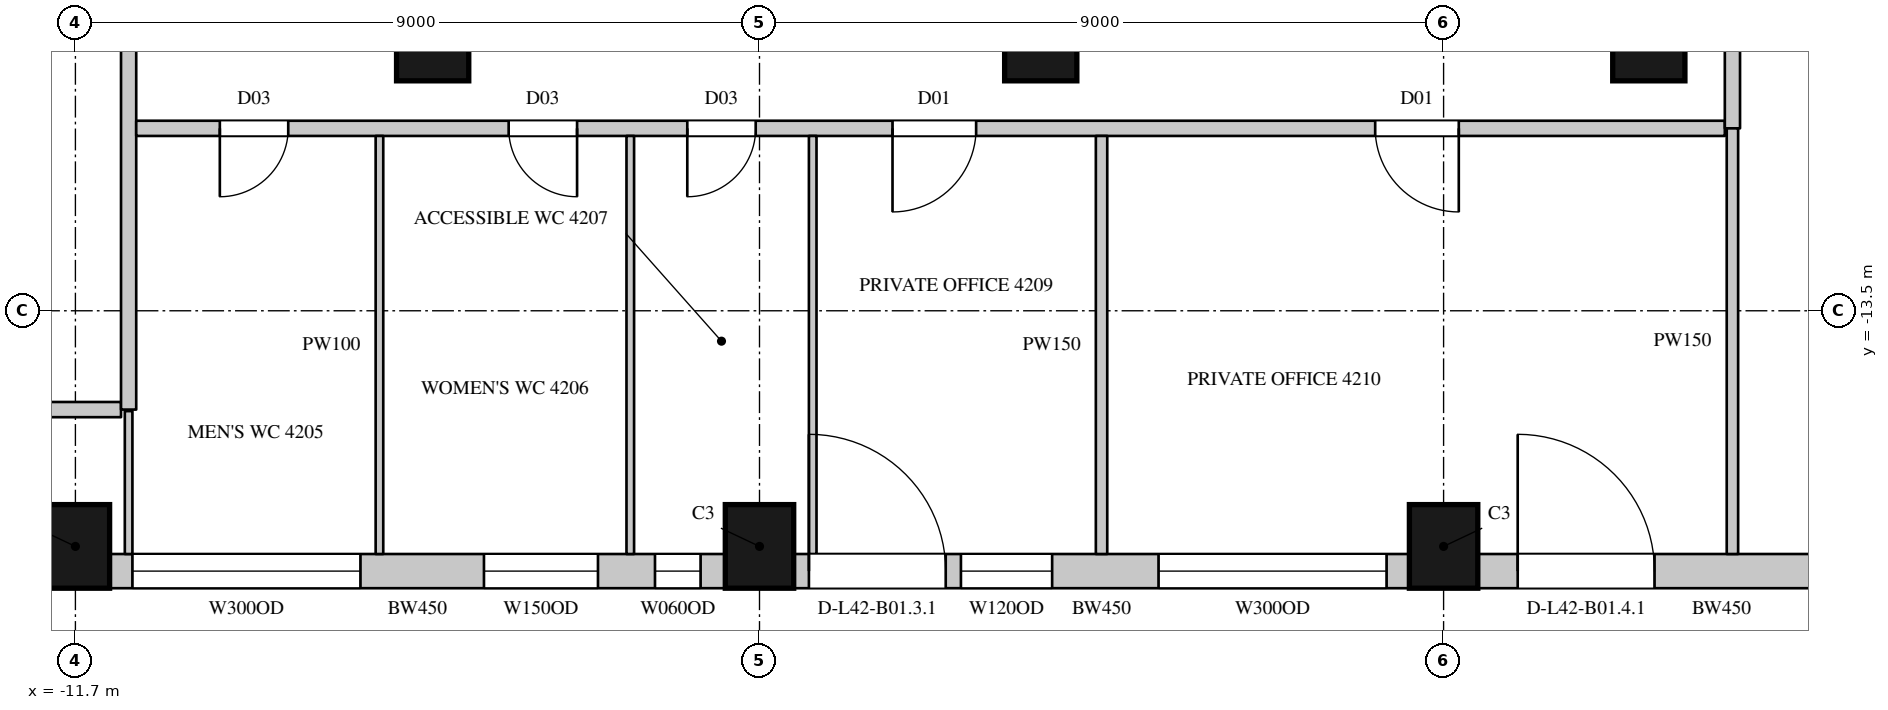
"""IFC4 building model, lengths in metres.
Left out: names, types, materials, properties, quantities, classifications, styles, units other than length and angle.
Written with IfcOpenShell. Run it as: python <this file> out.ifc"""

import sys

from ifc_helpers import new_model, si_unit, direction, frame, frame_2d, origin, origin_2d, place, context, subcontext, project, spatial, rectangle, circle, extrude, element, fill, save


model = new_model("IFC4")
c1 = context("Model", 3, precision=1e-05, world=origin(), true_north=direction((0.0, 1.0)))
c2 = subcontext(c1, "Body", "Model", "MODEL_VIEW")
j1 = project(units=[si_unit("LENGTHUNIT", "METRE"), si_unit("PLANEANGLEUNIT", "RADIAN")], contexts=[c1])
p1 = place(None, origin())
s1 = spatial("IfcSite", under=j1, at=p1, CompositionType="ELEMENT")
p2 = place(p1, origin())
s2 = spatial("IfcBuilding", under=s1, at=p2, CompositionType="ELEMENT")
p3 = place(p2, frame((0.0, 0.0, 193.3)))
s3 = spatial("IfcBuildingStorey", under=s2, at=p3, CompositionType="ELEMENT", Elevation=193.3)
for number, where, z_axis, x_axis in (
    (1, (-11.7, -16.6, 0.0), (0.0, 0.0, 1.0), (1.0, 0.0, 0.0)),
    (2, (-2.7, -16.6, 0.0), (0.0, 0.0, 1.0), (1.0, 0.0, 0.0)),
    (3, (6.3, -16.6, 0.0), (0.0, 0.0, 1.0), (1.0, 0.0, 0.0)),
):
    element("IfcColumn", number, at=place(p3, frame(where, z_axis=z_axis, x_axis=x_axis)), inside=s3, PredefinedType="COLUMN", context=c2, shape_type="SweptSolid", body=[
        extrude(rectangle(XDim=0.9, YDim=1.1, at=origin_2d()), origin(), (0.0, 0.0, 1.0), 4.1),
    ])
for number, where, z_axis, x_axis in (
    (4, (-7.0, -10.0, 0.0), (0.0, 0.0, 1.0), (1.0, 0.0, 0.0)),
    (5, (1.0, -10.0, 0.0), (0.0, 0.0, 1.0), (1.0, 0.0, 0.0)),
    (6, (9.0, -10.0, 0.0), (0.0, 0.0, 1.0), (1.0, 0.0, 0.0)),
):
    element("IfcColumn", number, at=place(p3, frame(where, z_axis=z_axis, x_axis=x_axis)), inside=s3, PredefinedType="COLUMN", context=c2, shape_type="SweptSolid", body=[
        extrude(circle(Radius=0.475, at=origin_2d()), origin(), (0.0, 0.0, 1.0), 4.1),
    ])
p4 = place(p3, frame((-11.25, -16.925, 0.0), z_axis=(0.0, 0.0, 1.0), x_axis=(1.0, 0.0, 0.0)))
e7 = element("IfcWall", 7, at=p4, inside=s3, PredefinedType="SOLIDWALL", context=c2, shape_type="SweptSolid", body=[
    extrude(rectangle(XDim=8.1, YDim=0.45, at=frame_2d((4.05, 0.0))), origin(), (0.0, 0.0, 1.0), 3.8),
])
p5 = place(p4, frame((0.3, 0.0, 1.05)))
e8 = element("IfcOpeningElement", 8, at=p5, cuts=e7, PredefinedType="OPENING", context=c2, shape_type="SweptSolid", body=[
    extrude(rectangle(XDim=3.0, YDim=2.4, at=frame_2d((1.5, 1.2))), frame((0.0, 0.235, 0.0), z_axis=(0.0, -1.0, 0.0), x_axis=(1.0, 0.0, 0.0)), (0.0, 0.0, 1.0), 0.47),
])
p6 = place(p4, frame((4.925, 0.0, 1.05)))
e9 = element("IfcOpeningElement", 9, at=p6, cuts=e7, PredefinedType="OPENING", context=c2, shape_type="SweptSolid", body=[
    extrude(rectangle(XDim=1.5, YDim=2.4, at=frame_2d((0.75, 1.2))), frame((0.0, 0.235, 0.0), z_axis=(0.0, -1.0, 0.0), x_axis=(1.0, 0.0, 0.0)), (0.0, 0.0, 1.0), 0.47),
])
p7 = place(p4, frame((7.175, 0.0, 1.05)))
e10 = element("IfcOpeningElement", 10, at=p7, cuts=e7, PredefinedType="OPENING", context=c2, shape_type="SweptSolid", body=[
    extrude(rectangle(XDim=0.6, YDim=2.4, at=frame_2d((0.3, 1.2))), frame((0.0, 0.235, 0.0), z_axis=(0.0, -1.0, 0.0), x_axis=(1.0, 0.0, 0.0)), (0.0, 0.0, 1.0), 0.47),
])
p8 = place(p3, frame((-2.25, -16.925, 0.0), z_axis=(0.0, 0.0, 1.0), x_axis=(1.0, 0.0, 0.0)))
e11 = element("IfcWall", 11, at=p8, inside=s3, PredefinedType="SOLIDWALL", context=c2, shape_type="SweptSolid", body=[
    extrude(rectangle(XDim=8.1, YDim=0.45, at=frame_2d((4.05, 0.0))), origin(), (0.0, 0.0, 1.0), 3.8),
])
p9 = place(p8, frame((0.2, 0.0, 0.0)))
e12 = element("IfcOpeningElement", 12, at=p9, cuts=e11, PredefinedType="OPENING", context=c2, shape_type="SweptSolid", body=[
    extrude(rectangle(XDim=1.8, YDim=2.4, at=frame_2d((0.9, 1.2))), frame((0.0, 0.235, 0.0), z_axis=(0.0, -1.0, 0.0), x_axis=(1.0, 0.0, 0.0)), (0.0, 0.0, 1.0), 0.47),
])
p10 = place(p8, frame((2.2, 0.0, 1.05)))
e13 = element("IfcOpeningElement", 13, at=p10, cuts=e11, PredefinedType="OPENING", context=c2, shape_type="SweptSolid", body=[
    extrude(rectangle(XDim=1.2, YDim=2.4, at=frame_2d((0.6, 1.2))), frame((0.0, 0.235, 0.0), z_axis=(0.0, -1.0, 0.0), x_axis=(1.0, 0.0, 0.0)), (0.0, 0.0, 1.0), 0.47),
])
p11 = place(p8, frame((4.8, 0.0, 1.05)))
e14 = element("IfcOpeningElement", 14, at=p11, cuts=e11, PredefinedType="OPENING", context=c2, shape_type="SweptSolid", body=[
    extrude(rectangle(XDim=3.0, YDim=2.4, at=frame_2d((1.5, 1.2))), frame((0.0, 0.235, 0.0), z_axis=(0.0, -1.0, 0.0), x_axis=(1.0, 0.0, 0.0)), (0.0, 0.0, 1.0), 0.47),
])
p12 = place(p3, frame((6.75, -16.925, 0.0), z_axis=(0.0, 0.0, 1.0), x_axis=(1.0, 0.0, 0.0)))
e15 = element("IfcWall", 15, at=p12, inside=s3, PredefinedType="SOLIDWALL", context=c2, shape_type="SweptSolid", body=[
    extrude(rectangle(XDim=6.414, YDim=0.45, at=frame_2d((3.207, 0.0))), origin(), (0.0, 0.0, 1.0), 3.8),
])
p13 = place(p12, frame((0.525, 0.0, 0.0)))
e16 = element("IfcOpeningElement", 16, at=p13, cuts=e15, PredefinedType="OPENING", context=c2, shape_type="SweptSolid", body=[
    extrude(rectangle(XDim=1.8, YDim=2.4, at=frame_2d((0.9, 1.2))), frame((0.0, 0.235, 0.0), z_axis=(0.0, -1.0, 0.0), x_axis=(1.0, 0.0, 0.0)), (0.0, 0.0, 1.0), 0.47),
])
p14 = place(p3, frame((-13.97, -14.8, 0.0), z_axis=(0.0, 0.0, 1.0), x_axis=(1.0, 0.0, 0.0)))
e17 = element("IfcWall", 17, at=p14, inside=s3, PredefinedType="PARTITIONING", context=c2, shape_type="SweptSolid", body=[
    extrude(rectangle(XDim=2.87, YDim=0.2, at=frame_2d((1.435, 0.0))), origin(), (0.0, 0.0, 1.0), 3.8),
])
p15 = place(p3, frame((-11.0, -14.8, 0.0), z_axis=(0.0, 0.0, 1.0), x_axis=(0.0, 1.0, 0.0)))
e18 = element("IfcWall", 18, at=p15, inside=s3, PredefinedType="PARTITIONING", context=c2, shape_type="SweptSolid", body=[
    extrude(rectangle(XDim=29.6, YDim=0.2, at=frame_2d((14.8, 0.0))), origin(), (0.0, 0.0, 1.0), 3.8),
])
p16 = place(p15, frame((20.15, 0.0, 0.0)))
e19 = element("IfcOpeningElement", 19, at=p16, cuts=e18, PredefinedType="OPENING", context=c2, shape_type="SweptSolid", body=[
    extrude(rectangle(XDim=1.5, YDim=2.4, at=frame_2d((0.75, 1.2))), frame((0.0, 0.11, 0.0), z_axis=(0.0, -1.0, 0.0), x_axis=(1.0, 0.0, 0.0)), (0.0, 0.0, 1.0), 0.22),
])
p17 = place(p3, frame((-10.9, -11.1, 0.0), z_axis=(0.0, 0.0, 1.0), x_axis=(1.0, 0.0, 0.0)))
e20 = element("IfcWall", 20, at=p17, inside=s3, PredefinedType="PARTITIONING", context=c2, shape_type="SweptSolid", body=[
    extrude(rectangle(XDim=20.9, YDim=0.2, at=frame_2d((10.45, 0.0))), origin(), (0.0, 0.0, 1.0), 3.8),
])
p18 = place(p17, frame((1.1, 0.0, 0.0)))
e21 = element("IfcOpeningElement", 21, at=p18, cuts=e20, PredefinedType="OPENING", context=c2, shape_type="SweptSolid", body=[
    extrude(rectangle(XDim=0.9, YDim=2.2, at=frame_2d((0.45, 1.1))), frame((0.0, 0.11, 0.0), z_axis=(0.0, -1.0, 0.0), x_axis=(1.0, 0.0, 0.0)), (0.0, 0.0, 1.0), 0.22),
])
p19 = place(p17, frame((4.9, 0.0, 0.0)))
e22 = element("IfcOpeningElement", 22, at=p19, cuts=e20, PredefinedType="OPENING", context=c2, shape_type="SweptSolid", body=[
    extrude(rectangle(XDim=0.9, YDim=2.2, at=frame_2d((0.45, 1.1))), frame((0.0, 0.11, 0.0), z_axis=(0.0, -1.0, 0.0), x_axis=(1.0, 0.0, 0.0)), (0.0, 0.0, 1.0), 0.22),
])
p20 = place(p17, frame((7.25, 0.0, 0.0)))
e23 = element("IfcOpeningElement", 23, at=p20, cuts=e20, PredefinedType="OPENING", context=c2, shape_type="SweptSolid", body=[
    extrude(rectangle(XDim=0.9, YDim=2.2, at=frame_2d((0.45, 1.1))), frame((0.0, 0.11, 0.0), z_axis=(0.0, -1.0, 0.0), x_axis=(1.0, 0.0, 0.0)), (0.0, 0.0, 1.0), 0.22),
])
p21 = place(p17, frame((9.95, 0.0, 0.0)))
e24 = element("IfcOpeningElement", 24, at=p21, cuts=e20, PredefinedType="OPENING", context=c2, shape_type="SweptSolid", body=[
    extrude(rectangle(XDim=1.1, YDim=2.4, at=frame_2d((0.55, 1.2))), frame((0.0, 0.11, 0.0), z_axis=(0.0, -1.0, 0.0), x_axis=(1.0, 0.0, 0.0)), (0.0, 0.0, 1.0), 0.22),
])
p22 = place(p17, frame((16.3, 0.0, 0.0)))
e25 = element("IfcOpeningElement", 25, at=p22, cuts=e20, PredefinedType="OPENING", context=c2, shape_type="SweptSolid", body=[
    extrude(rectangle(XDim=1.1, YDim=2.4, at=frame_2d((0.55, 1.2))), frame((0.0, 0.11, 0.0), z_axis=(0.0, -1.0, 0.0), x_axis=(1.0, 0.0, 0.0)), (0.0, 0.0, 1.0), 0.22),
])
p23 = place(p3, frame((10.1, -11.1, 0.0), z_axis=(0.0, 0.0, 1.0), x_axis=(0.0, 1.0, 0.0)))
e26 = element("IfcWall", 26, at=p23, inside=s3, PredefinedType="PARTITIONING", context=c2, shape_type="SweptSolid", body=[
    extrude(rectangle(XDim=23.2, YDim=0.2, at=frame_2d((11.6, 0.0))), origin(), (0.0, 0.0, 1.0), 3.8),
])
p24 = place(p23, frame((8.0, 0.0, 0.0)))
e27 = element("IfcOpeningElement", 27, at=p24, cuts=e26, PredefinedType="OPENING", context=c2, shape_type="SweptSolid", body=[
    extrude(rectangle(XDim=1.5, YDim=2.4, at=frame_2d((0.75, 1.2))), frame((0.0, 0.11, 0.0), z_axis=(0.0, -1.0, 0.0), x_axis=(1.0, 0.0, 0.0)), (0.0, 0.0, 1.0), 0.22),
])
p25 = place(p23, frame((18.95, 0.0, 0.0)))
e28 = element("IfcOpeningElement", 28, at=p25, cuts=e26, PredefinedType="OPENING", context=c2, shape_type="SweptSolid", body=[
    extrude(rectangle(XDim=1.1, YDim=2.4, at=frame_2d((0.55, 1.2))), frame((0.0, 0.11, 0.0), z_axis=(0.0, -1.0, 0.0), x_axis=(1.0, 0.0, 0.0)), (0.0, 0.0, 1.0), 0.22),
])
p26 = place(p23, frame((2.7, 0.0, 0.0)))
e29 = element("IfcOpeningElement", 29, at=p26, cuts=e26, PredefinedType="OPENING", context=c2, shape_type="SweptSolid", body=[
    extrude(rectangle(XDim=1.1, YDim=2.4, at=frame_2d((0.55, 1.2))), frame((0.0, 0.11, 0.0), z_axis=(0.0, -1.0, 0.0), x_axis=(1.0, 0.0, 0.0)), (0.0, 0.0, 1.0), 0.22),
])
p27 = place(p3, frame((1.8, -16.7, 0.0), z_axis=(0.0, 0.0, 1.0), x_axis=(0.0, 1.0, 0.0)))
e30 = element("IfcWall", 30, at=p27, inside=s3, PredefinedType="PARTITIONING", context=c2, shape_type="SweptSolid", body=[
    extrude(rectangle(XDim=5.5, YDim=0.15, at=frame_2d((2.75, 0.0))), origin(), (0.0, 0.0, 1.0), 3.15),
])
p28 = place(p3, frame((10.1, -16.7, 0.0), z_axis=(0.0, 0.0, 1.0), x_axis=(0.0, 1.0, 0.0)))
e31 = element("IfcWall", 31, at=p28, inside=s3, PredefinedType="PARTITIONING", context=c2, shape_type="SweptSolid", body=[
    extrude(rectangle(XDim=5.6, YDim=0.15, at=frame_2d((2.8, 0.0))), origin(), (0.0, 0.0, 1.0), 3.8),
])
p29 = place(p3, frame((-11.0, -16.7, 0.0), z_axis=(0.0, 0.0, 1.0), x_axis=(0.0, 1.0, 0.0)))
e32 = element("IfcWall", 32, at=p29, inside=s3, PredefinedType="PARTITIONING", context=c2, shape_type="SweptSolid", body=[
    extrude(rectangle(XDim=1.88, YDim=0.1, at=frame_2d((0.94, 0.0))), origin(), (0.0, 0.0, 1.0), 3.8),
])
for number, where, z_axis, x_axis in (
    (33, (-7.7, -16.7, 0.0), (0.0, 0.0, 1.0), (0.0, 1.0, 0.0)),
    (34, (-4.4, -16.7, 0.0), (0.0, 0.0, 1.0), (0.0, 1.0, 0.0)),
    (35, (-2.0, -16.7, 0.0), (0.0, 0.0, 1.0), (0.0, 1.0, 0.0)),
):
    element("IfcWall", number, at=place(p3, frame(where, z_axis=z_axis, x_axis=x_axis)), inside=s3, PredefinedType="PARTITIONING", context=c2, shape_type="SweptSolid", body=[
        extrude(rectangle(XDim=5.5, YDim=0.1, at=frame_2d((2.75, 0.0))), origin(), (0.0, 0.0, 1.0), 3.8),
    ])
p30 = place(p5, origin())
e36 = element("IfcWindow", 36, at=p30, inside=s3, PartitioningType="SINGLE_PANEL", PredefinedType="WINDOW", context=c2, shape_type="SweptSolid", body=[
    extrude(rectangle(XDim=3.0, YDim=2.4, at=frame_2d((1.5, 1.2))), frame((0.0, 0.135, 0.0), z_axis=(0.0, -1.0, 0.0), x_axis=(1.0, 0.0, 0.0)), (0.0, 0.0, 1.0), 0.06),
])
fill(e8, e36)
p31 = place(p9, origin())
e37 = element("IfcDoor", 37, at=p31, inside=s3, OperationType="SLIDING_TO_LEFT", PredefinedType="DOOR", context=c2, shape_type="SweptSolid", body=[
    extrude(rectangle(XDim=1.8, YDim=2.4, at=frame_2d((0.9, 1.2))), frame((0.0, 0.13, 0.0), z_axis=(0.0, -1.0, 0.0), x_axis=(1.0, 0.0, 0.0)), (0.0, 0.0, 1.0), 0.05),
])
fill(e12, e37)
p32 = place(p10, origin())
e38 = element("IfcWindow", 38, at=p32, inside=s3, PartitioningType="SINGLE_PANEL", PredefinedType="WINDOW", context=c2, shape_type="SweptSolid", body=[
    extrude(rectangle(XDim=1.2, YDim=2.4, at=frame_2d((0.6, 1.2))), frame((0.0, 0.135, 0.0), z_axis=(0.0, -1.0, 0.0), x_axis=(1.0, 0.0, 0.0)), (0.0, 0.0, 1.0), 0.06),
])
fill(e13, e38)
p33 = place(p11, origin())
e39 = element("IfcWindow", 39, at=p33, inside=s3, PartitioningType="SINGLE_PANEL", PredefinedType="WINDOW", context=c2, shape_type="SweptSolid", body=[
    extrude(rectangle(XDim=3.0, YDim=2.4, at=frame_2d((1.5, 1.2))), frame((0.0, 0.135, 0.0), z_axis=(0.0, -1.0, 0.0), x_axis=(1.0, 0.0, 0.0)), (0.0, 0.0, 1.0), 0.06),
])
fill(e14, e39)
p34 = place(p13, origin())
e40 = element("IfcDoor", 40, at=p34, inside=s3, OperationType="SLIDING_TO_LEFT", PredefinedType="DOOR", context=c2, shape_type="SweptSolid", body=[
    extrude(rectangle(XDim=1.8, YDim=2.4, at=frame_2d((0.9, 1.2))), frame((0.0, 0.13, 0.0), z_axis=(0.0, -1.0, 0.0), x_axis=(1.0, 0.0, 0.0)), (0.0, 0.0, 1.0), 0.05),
])
fill(e16, e40)
p35 = place(p18, origin())
e41 = element("IfcDoor", 41, at=p35, inside=s3, OperationType="SINGLE_SWING_RIGHT", PredefinedType="DOOR", context=c2, shape_type="SweptSolid", body=[
    extrude(rectangle(XDim=0.9, YDim=2.2, at=frame_2d((0.45, 1.1))), frame((0.0, 0.025, 0.0), z_axis=(0.0, -1.0, 0.0), x_axis=(1.0, 0.0, 0.0)), (0.0, 0.0, 1.0), 0.05),
])
fill(e21, e41)
p36 = place(p19, origin())
e42 = element("IfcDoor", 42, at=p36, inside=s3, OperationType="SINGLE_SWING_LEFT", PredefinedType="DOOR", context=c2, shape_type="SweptSolid", body=[
    extrude(rectangle(XDim=0.9, YDim=2.2, at=frame_2d((0.45, 1.1))), frame((0.0, 0.025, 0.0), z_axis=(0.0, -1.0, 0.0), x_axis=(1.0, 0.0, 0.0)), (0.0, 0.0, 1.0), 0.05),
])
fill(e22, e42)
p37 = place(p20, origin())
e43 = element("IfcDoor", 43, at=p37, inside=s3, OperationType="SINGLE_SWING_RIGHT", PredefinedType="DOOR", context=c2, shape_type="SweptSolid", body=[
    extrude(rectangle(XDim=0.9, YDim=2.2, at=frame_2d((0.45, 1.1))), frame((0.0, 0.025, 0.0), z_axis=(0.0, -1.0, 0.0), x_axis=(1.0, 0.0, 0.0)), (0.0, 0.0, 1.0), 0.05),
])
fill(e23, e43)
p38 = place(p21, origin())
e44 = element("IfcDoor", 44, at=p38, inside=s3, OperationType="SINGLE_SWING_RIGHT", PredefinedType="DOOR", context=c2, shape_type="SweptSolid", body=[
    extrude(rectangle(XDim=1.1, YDim=2.4, at=frame_2d((0.55, 1.2))), frame((0.0, 0.025, 0.0), z_axis=(0.0, -1.0, 0.0), x_axis=(1.0, 0.0, 0.0)), (0.0, 0.0, 1.0), 0.05),
])
fill(e24, e44)
p39 = place(p22, origin())
e45 = element("IfcDoor", 45, at=p39, inside=s3, OperationType="SINGLE_SWING_LEFT", PredefinedType="DOOR", context=c2, shape_type="SweptSolid", body=[
    extrude(rectangle(XDim=1.1, YDim=2.4, at=frame_2d((0.55, 1.2))), frame((0.0, 0.025, 0.0), z_axis=(0.0, -1.0, 0.0), x_axis=(1.0, 0.0, 0.0)), (0.0, 0.0, 1.0), 0.05),
])
fill(e25, e45)
p40 = place(p6, origin())
e46 = element("IfcWindow", 46, at=p40, inside=s3, PartitioningType="SINGLE_PANEL", PredefinedType="WINDOW", context=c2, shape_type="SweptSolid", body=[
    extrude(rectangle(XDim=1.5, YDim=2.4, at=frame_2d((0.75, 1.2))), frame((0.0, 0.135, 0.0), z_axis=(0.0, -1.0, 0.0), x_axis=(1.0, 0.0, 0.0)), (0.0, 0.0, 1.0), 0.06),
])
fill(e9, e46)
p41 = place(p7, origin())
e47 = element("IfcWindow", 47, at=p41, inside=s3, PartitioningType="SINGLE_PANEL", PredefinedType="WINDOW", context=c2, shape_type="SweptSolid", body=[
    extrude(rectangle(XDim=0.6, YDim=2.4, at=frame_2d((0.3, 1.2))), frame((0.0, 0.135, 0.0), z_axis=(0.0, -1.0, 0.0), x_axis=(1.0, 0.0, 0.0)), (0.0, 0.0, 1.0), 0.06),
])
fill(e10, e47)
save(model, sys.argv[1])
